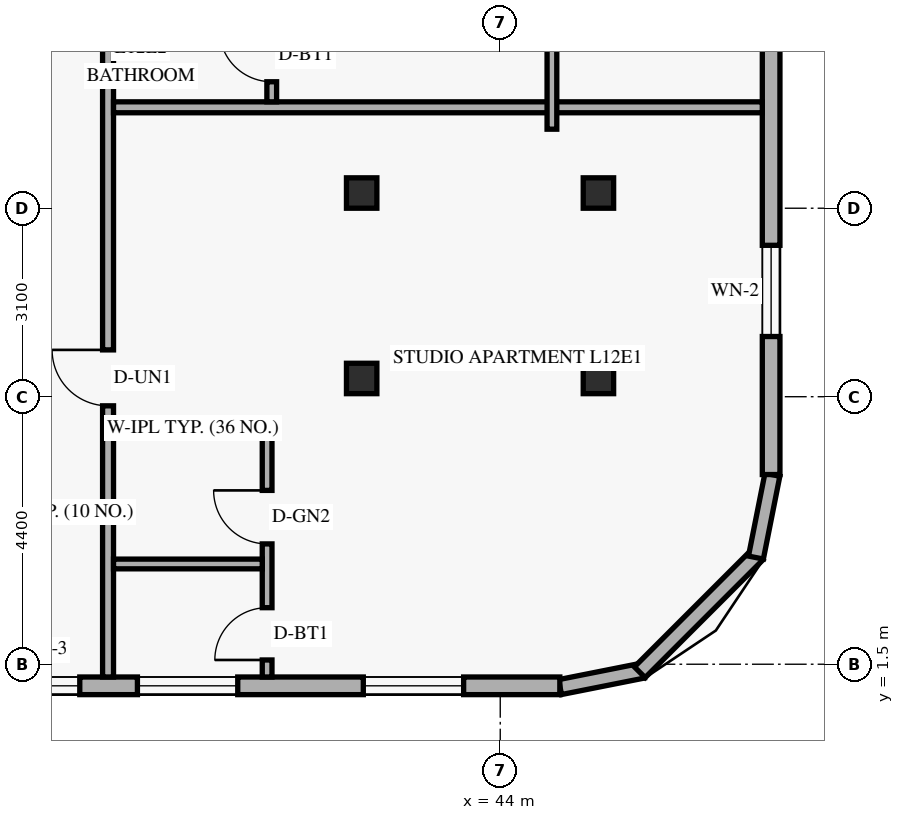
"""IFC4 building model, lengths in metres.
Left out: names, types, materials, properties, quantities, classifications, styles, units other than length and angle.
Written with IfcOpenShell. Run it as: python <this file> out.ifc"""

import sys

from ifc_helpers import new_model, si_unit, direction, frame, frame_2d, origin, origin_2d, place, context, subcontext, project, spatial, rectangle, hollow_rectangle, extrude, element, fill, save


model = new_model("IFC4")
c1 = context("Model", 3, precision=1e-05, world=origin(), true_north=direction((0.0, 1.0)))
c2 = subcontext(c1, "Body", "Model", "MODEL_VIEW")
j1 = project(units=[si_unit("LENGTHUNIT", "METRE"), si_unit("PLANEANGLEUNIT", "RADIAN")], contexts=[c1])
p1 = place(None, origin())
s1 = spatial("IfcSite", under=j1, at=p1, CompositionType="ELEMENT")
p2 = place(p1, origin())
s2 = spatial("IfcBuilding", under=s1, at=p2, CompositionType="ELEMENT")
p3 = place(p2, frame((0.0, 0.0, 49.2)))
s3 = spatial("IfcBuildingStorey", under=s2, at=p3, CompositionType="ELEMENT", Elevation=49.2)
for number, where, z_axis, x_axis in (
    (1, (41.658, 6.2, 0.0), (0.035, 0.0, 0.999), (0.0, 1.0, 0.0)),
    (2, (41.658, 9.25, 0.0), (0.035, 0.0, 0.999), (0.0, 1.0, 0.0)),
):
    element("IfcColumn", number, at=place(p3, frame(where, z_axis=z_axis, x_axis=x_axis)), inside=s3, PredefinedType="COLUMN", context=c2, shape_type="SweptSolid", body=[
        extrude(hollow_rectangle(XDim=0.5, YDim=0.5, WallThickness=0.022, at=origin_2d()), origin(), (0.0, 0.0, 1.0), 3.602),
    ])
for number, where, z_axis, x_axis in (
    (3, (45.51, 6.2, 0.0), (0.058, 0.0, 0.998), (0.0, 1.0, 0.0)),
    (4, (45.51, 9.25, 0.0), (0.058, 0.0, 0.998), (0.0, 1.0, 0.0)),
):
    element("IfcColumn", number, at=place(p3, frame(where, z_axis=z_axis, x_axis=x_axis)), inside=s3, PredefinedType="COLUMN", context=c2, shape_type="SweptSolid", body=[
        extrude(hollow_rectangle(XDim=0.5, YDim=0.5, WallThickness=0.022, at=origin_2d()), origin(), (0.0, 0.0, 1.0), 3.606),
    ])
p4 = place(p3, frame((44.983, 1.124, 0.0), z_axis=(0.0, 0.0, 1.0), x_axis=(0.980809899341, 0.19496651342, 0.0)))
e5 = element("IfcWall", 5, at=p4, inside=s3, PredefinedType="SOLIDWALL", context=c2, shape_type="SweptSolid", body=[
    extrude(rectangle(XDim=1.389, YDim=0.25, at=frame_2d((0.694, 0.0))), origin(), (0.0, 0.0, 1.0), 3.36),
])
p5 = place(p3, frame((46.295, 1.368, 0.0), z_axis=(0.0, 0.0, 1.0), x_axis=(0.707106781187, 0.707106781187, 0.0)))
e6 = element("IfcWall", 6, at=p5, inside=s3, PredefinedType="SOLIDWALL", context=c2, shape_type="SweptSolid", body=[
    extrude(rectangle(XDim=2.739, YDim=0.25, at=frame_2d((1.37, 0.0))), origin(), (0.0, 0.0, 1.0), 3.36),
])
p6 = place(p3, frame((48.205, 3.254, 0.0), z_axis=(0.0, 0.0, 1.0), x_axis=(0.19496651342, 0.980809899341, 0.0)))
e7 = element("IfcWall", 7, at=p6, inside=s3, PredefinedType="SOLIDWALL", context=c2, shape_type="SweptSolid", body=[
    extrude(rectangle(XDim=1.389, YDim=0.25, at=frame_2d((0.694, 0.0))), origin(), (0.0, 0.0, 1.0), 3.36),
])
p7 = place(p3, frame((5.42, 1.145, 0.0), z_axis=(0.0, 0.0, 1.0), x_axis=(1.0, 0.0, 0.0)))
e8 = element("IfcWall", 8, at=p7, inside=s3, PredefinedType="SOLIDWALL", context=c2, shape_type="SweptSolid", body=[
    extrude(rectangle(XDim=39.56, YDim=0.29, at=frame_2d((19.78, 0.0))), origin(), (0.0, 0.0, 1.0), 3.36),
])
p8 = place(p7, frame((2.615, 0.0, 0.85)))
e9 = element("IfcOpeningElement", 9, at=p8, cuts=e8, PredefinedType="OPENING", context=c2, shape_type="SweptSolid", body=[
    extrude(rectangle(XDim=1.65, YDim=1.6, at=frame_2d((0.825, 0.8))), frame((0.0, 0.155, 0.0), z_axis=(0.0, -1.0, 0.0), x_axis=(1.0, 0.0, 0.0)), (0.0, 0.0, 1.0), 0.31),
])
p9 = place(p7, frame((7.18, 0.0, 0.85)))
e10 = element("IfcOpeningElement", 10, at=p9, cuts=e8, PredefinedType="OPENING", context=c2, shape_type="SweptSolid", body=[
    extrude(rectangle(XDim=1.2, YDim=1.5, at=frame_2d((0.6, 0.75))), frame((0.0, 0.155, 0.0), z_axis=(0.0, -1.0, 0.0), x_axis=(1.0, 0.0, 0.0)), (0.0, 0.0, 1.0), 0.31),
])
p10 = place(p7, frame((11.906, 0.0, 0.85)))
e11 = element("IfcOpeningElement", 11, at=p10, cuts=e8, PredefinedType="OPENING", context=c2, shape_type="SweptSolid", body=[
    extrude(rectangle(XDim=1.65, YDim=1.6, at=frame_2d((0.825, 0.8))), frame((0.0, 0.155, 0.0), z_axis=(0.0, -1.0, 0.0), x_axis=(1.0, 0.0, 0.0)), (0.0, 0.0, 1.0), 0.31),
])
p11 = place(p7, frame((18.515, 0.0, 0.85)))
e12 = element("IfcOpeningElement", 12, at=p11, cuts=e8, PredefinedType="OPENING", context=c2, shape_type="SweptSolid", body=[
    extrude(rectangle(XDim=1.65, YDim=1.6, at=frame_2d((0.825, 0.8))), frame((0.0, 0.155, 0.0), z_axis=(0.0, -1.0, 0.0), x_axis=(1.0, 0.0, 0.0)), (0.0, 0.0, 1.0), 0.31),
])
p12 = place(p7, frame((25.124, 0.0, 0.85)))
e13 = element("IfcOpeningElement", 13, at=p12, cuts=e8, PredefinedType="OPENING", context=c2, shape_type="SweptSolid", body=[
    extrude(rectangle(XDim=1.65, YDim=1.6, at=frame_2d((0.825, 0.8))), frame((0.0, 0.155, 0.0), z_axis=(0.0, -1.0, 0.0), x_axis=(1.0, 0.0, 0.0)), (0.0, 0.0, 1.0), 0.31),
])
p13 = place(p7, frame((30.465, 0.0, 0.85)))
e14 = element("IfcOpeningElement", 14, at=p13, cuts=e8, PredefinedType="OPENING", context=c2, shape_type="SweptSolid", body=[
    extrude(rectangle(XDim=1.2, YDim=1.5, at=frame_2d((0.6, 0.75))), frame((0.0, 0.155, 0.0), z_axis=(0.0, -1.0, 0.0), x_axis=(1.0, 0.0, 0.0)), (0.0, 0.0, 1.0), 0.31),
])
p14 = place(p7, frame((32.613, 0.0, 0.85)))
e15 = element("IfcOpeningElement", 15, at=p14, cuts=e8, PredefinedType="OPENING", context=c2, shape_type="SweptSolid", body=[
    extrude(rectangle(XDim=1.65, YDim=1.6, at=frame_2d((0.825, 0.8))), frame((0.0, 0.155, 0.0), z_axis=(0.0, -1.0, 0.0), x_axis=(1.0, 0.0, 0.0)), (0.0, 0.0, 1.0), 0.31),
])
p15 = place(p7, frame((36.328, 0.0, 0.85)))
e16 = element("IfcOpeningElement", 16, at=p15, cuts=e8, PredefinedType="OPENING", context=c2, shape_type="SweptSolid", body=[
    extrude(rectangle(XDim=1.65, YDim=1.6, at=frame_2d((0.825, 0.8))), frame((0.0, 0.155, 0.0), z_axis=(0.0, -1.0, 0.0), x_axis=(1.0, 0.0, 0.0)), (0.0, 0.0, 1.0), 0.31),
])
p16 = place(p3, frame((48.455, 4.62, 0.0), z_axis=(0.0, 0.0, 1.0), x_axis=(0.0, 1.0, 0.0)))
e17 = element("IfcWall", 17, at=p16, inside=s3, PredefinedType="SOLIDWALL", context=c2, shape_type="SweptSolid", body=[
    extrude(rectangle(XDim=17.79, YDim=0.29, at=frame_2d((8.895, 0.0))), origin(), (0.0, 0.0, 1.0), 3.36),
])
p17 = place(p16, frame((2.27, 0.0, 0.85)))
e18 = element("IfcOpeningElement", 18, at=p17, cuts=e17, PredefinedType="OPENING", context=c2, shape_type="SweptSolid", body=[
    extrude(rectangle(XDim=1.5, YDim=1.55, at=frame_2d((0.75, 0.775))), frame((0.0, 0.155, 0.0), z_axis=(0.0, -1.0, 0.0), x_axis=(1.0, 0.0, 0.0)), (0.0, 0.0, 1.0), 0.31),
])
p18 = place(p16, frame((8.235, 0.0, 0.85)))
e19 = element("IfcOpeningElement", 19, at=p18, cuts=e17, PredefinedType="OPENING", context=c2, shape_type="SweptSolid", body=[
    extrude(rectangle(XDim=1.5, YDim=1.55, at=frame_2d((0.75, 0.775))), frame((0.0, 0.155, 0.0), z_axis=(0.0, -1.0, 0.0), x_axis=(1.0, 0.0, 0.0)), (0.0, 0.0, 1.0), 0.31),
])
p19 = place(p16, frame((14.11, 0.0, 0.85)))
e20 = element("IfcOpeningElement", 20, at=p19, cuts=e17, PredefinedType="OPENING", context=c2, shape_type="SweptSolid", body=[
    extrude(rectangle(XDim=1.5, YDim=1.55, at=frame_2d((0.75, 0.775))), frame((0.0, 0.155, 0.0), z_axis=(0.0, -1.0, 0.0), x_axis=(1.0, 0.0, 0.0)), (0.0, 0.0, 1.0), 0.31),
])
p20 = place(p3, frame((37.55, 1.29, 0.0), z_axis=(0.0, 0.0, 1.0), x_axis=(0.0, 1.0, 0.0)))
e21 = element("IfcWall", 21, at=p20, inside=s3, PredefinedType="STANDARD", context=c2, shape_type="SweptSolid", body=[
    extrude(rectangle(XDim=45.42, YDim=0.18, at=frame_2d((22.71, 0.0))), origin(), (0.0, 0.0, 1.0), 2.649),
])
p21 = place(p20, frame((4.46, 0.0, 0.0)))
e22 = element("IfcOpeningElement", 22, at=p21, cuts=e21, PredefinedType="OPENING", context=c2, shape_type="SweptSolid", body=[
    extrude(rectangle(XDim=0.92, YDim=2.15, at=frame_2d((0.46, 1.075))), frame((0.0, 0.1, 0.0), z_axis=(0.0, -1.0, 0.0), x_axis=(1.0, 0.0, 0.0)), (0.0, 0.0, 1.0), 0.2),
])
p22 = place(p20, frame((14.37, 0.0, 0.0)))
e23 = element("IfcOpeningElement", 23, at=p22, cuts=e21, PredefinedType="OPENING", context=c2, shape_type="SweptSolid", body=[
    extrude(rectangle(XDim=0.92, YDim=2.15, at=frame_2d((0.46, 1.075))), frame((0.0, 0.1, 0.0), z_axis=(0.0, -1.0, 0.0), x_axis=(1.0, 0.0, 0.0)), (0.0, 0.0, 1.0), 0.2),
])
p23 = place(p20, frame((25.87, 0.0, 0.0)))
e24 = element("IfcOpeningElement", 24, at=p23, cuts=e21, PredefinedType="OPENING", context=c2, shape_type="SweptSolid", body=[
    extrude(rectangle(XDim=0.92, YDim=2.15, at=frame_2d((0.46, 1.075))), frame((0.0, 0.1, 0.0), z_axis=(0.0, -1.0, 0.0), x_axis=(1.0, 0.0, 0.0)), (0.0, 0.0, 1.0), 0.2),
])
p24 = place(p20, frame((40.02, 0.0, 0.0)))
e25 = element("IfcOpeningElement", 25, at=p24, cuts=e21, PredefinedType="OPENING", context=c2, shape_type="SweptSolid", body=[
    extrude(rectangle(XDim=0.92, YDim=2.15, at=frame_2d((0.46, 1.075))), frame((0.0, 0.1, 0.0), z_axis=(0.0, -1.0, 0.0), x_axis=(1.0, 0.0, 0.0)), (0.0, 0.0, 1.0), 0.2),
])
p25 = place(p3, frame((37.64, 5.39, 0.0), z_axis=(0.0, 0.0, 1.0), x_axis=(1.0, 0.0, 0.0)))
e26 = element("IfcWall", 26, at=p25, inside=s3, PredefinedType="PLUMBINGWALL", context=c2, shape_type="SweptSolid", body=[
    extrude(rectangle(XDim=2.606, YDim=0.16, at=frame_2d((1.303, 0.0))), origin(), (0.0, 0.0, 1.0), 3.36),
])
p26 = place(p3, frame((40.166, 1.29, 0.0), z_axis=(0.0, 0.0, 1.0), x_axis=(0.0, 1.0, 0.0)))
e27 = element("IfcWall", 27, at=p26, inside=s3, PredefinedType="PLUMBINGWALL", context=c2, shape_type="SweptSolid", body=[
    extrude(rectangle(XDim=4.19, YDim=0.16, at=frame_2d((2.095, 0.0))), origin(), (0.0, 0.0, 1.0), 3.36),
])
p27 = place(p26, frame((0.28, 0.0, 0.0)))
e28 = element("IfcOpeningElement", 28, at=p27, cuts=e27, PredefinedType="OPENING", context=c2, shape_type="SweptSolid", body=[
    extrude(rectangle(XDim=0.86, YDim=2.12, at=frame_2d((0.43, 1.06))), frame((0.0, 0.09, 0.0), z_axis=(0.0, -1.0, 0.0), x_axis=(1.0, 0.0, 0.0)), (0.0, 0.0, 1.0), 0.18),
])
p28 = place(p26, frame((2.189, 0.0, 0.0)))
e29 = element("IfcOpeningElement", 29, at=p28, cuts=e27, PredefinedType="OPENING", context=c2, shape_type="SweptSolid", body=[
    extrude(rectangle(XDim=0.88, YDim=2.12, at=frame_2d((0.44, 1.06))), frame((0.0, 0.09, 0.0), z_axis=(0.0, -1.0, 0.0), x_axis=(1.0, 0.0, 0.0)), (0.0, 0.0, 1.0), 0.18),
])
p29 = place(p3, frame((37.64, 3.149, 0.0), z_axis=(0.0, 0.0, 1.0), x_axis=(1.0, 0.0, 0.0)))
e30 = element("IfcWall", 30, at=p29, inside=s3, PredefinedType="PLUMBINGWALL", context=c2, shape_type="SweptSolid", body=[
    extrude(rectangle(XDim=2.446, YDim=0.16, at=frame_2d((1.223, 0.0))), origin(), (0.0, 0.0, 1.0), 3.36),
])
p30 = place(p3, frame((37.64, 10.66, 0.0), z_axis=(0.0, 0.0, 1.0), x_axis=(1.0, 0.0, 0.0)))
e31 = element("IfcWall", 31, at=p30, inside=s3, PredefinedType="PARTITIONING", context=c2, shape_type="SweptSolid", body=[
    extrude(rectangle(XDim=10.67, YDim=0.18, at=frame_2d((5.335, 0.0))), origin(), (0.0, 0.0, 1.0), 2.649),
])
p31 = place(p3, frame((40.242, 10.75, 0.0), z_axis=(0.0, 0.0, 1.0), x_axis=(0.0, 1.0, 0.0)))
e32 = element("IfcWall", 32, at=p31, inside=s3, PredefinedType="PLUMBINGWALL", context=c2, shape_type="SweptSolid", body=[
    extrude(rectangle(XDim=4.64, YDim=0.16, at=frame_2d((2.32, 0.0))), origin(), (0.0, 0.0, 1.0), 2.932),
])
p32 = place(p31, frame((0.33, 0.0, 0.0)))
e33 = element("IfcOpeningElement", 33, at=p32, cuts=e32, PredefinedType="OPENING", context=c2, shape_type="SweptSolid", body=[
    extrude(rectangle(XDim=0.86, YDim=2.12, at=frame_2d((0.43, 1.06))), frame((0.0, 0.09, 0.0), z_axis=(0.0, -1.0, 0.0), x_axis=(1.0, 0.0, 0.0)), (0.0, 0.0, 1.0), 0.18),
])
p33 = place(p31, frame((2.423, 0.0, 0.0)))
e34 = element("IfcOpeningElement", 34, at=p33, cuts=e32, PredefinedType="OPENING", context=c2, shape_type="SweptSolid", body=[
    extrude(rectangle(XDim=0.88, YDim=2.12, at=frame_2d((0.44, 1.06))), frame((0.0, 0.09, 0.0), z_axis=(0.0, -1.0, 0.0), x_axis=(1.0, 0.0, 0.0)), (0.0, 0.0, 1.0), 0.18),
])
p34 = place(p3, frame((44.85, 10.3, 0.0), z_axis=(0.0, 0.0, 1.0), x_axis=(0.0, 1.0, 0.0)))
e35 = element("IfcWall", 35, at=p34, inside=s3, PredefinedType="PARTITIONING", context=c2, shape_type="SweptSolid", body=[
    extrude(rectangle(XDim=6.25, YDim=0.16, at=frame_2d((3.125, 0.0))), origin(), (0.0, 0.0, 1.0), 2.932),
])
p35 = place(p13, origin())
e36 = element("IfcWindow", 36, at=p35, inside=s3, PartitioningType="SINGLE_PANEL", PredefinedType="WINDOW", context=c2, shape_type="SweptSolid", body=[
    extrude(rectangle(XDim=1.2, YDim=1.5, at=frame_2d((0.6, 0.75))), frame((0.0, 0.03, 0.0), z_axis=(0.0, -1.0, 0.0), x_axis=(1.0, 0.0, 0.0)), (0.0, 0.0, 1.0), 0.06),
])
fill(e14, e36)
p36 = place(p14, origin())
e37 = element("IfcWindow", 37, at=p36, inside=s3, PartitioningType="SINGLE_PANEL", PredefinedType="WINDOW", context=c2, shape_type="SweptSolid", body=[
    extrude(rectangle(XDim=1.65, YDim=1.6, at=frame_2d((0.825, 0.8))), frame((0.0, 0.03, 0.0), z_axis=(0.0, -1.0, 0.0), x_axis=(1.0, 0.0, 0.0)), (0.0, 0.0, 1.0), 0.06),
])
fill(e15, e37)
p37 = place(p15, origin())
e38 = element("IfcWindow", 38, at=p37, inside=s3, PartitioningType="SINGLE_PANEL", PredefinedType="WINDOW", context=c2, shape_type="SweptSolid", body=[
    extrude(rectangle(XDim=1.65, YDim=1.6, at=frame_2d((0.825, 0.8))), frame((0.0, 0.03, 0.0), z_axis=(0.0, -1.0, 0.0), x_axis=(1.0, 0.0, 0.0)), (0.0, 0.0, 1.0), 0.06),
])
fill(e16, e38)
p38 = place(p17, origin())
e39 = element("IfcWindow", 39, at=p38, inside=s3, PartitioningType="SINGLE_PANEL", PredefinedType="WINDOW", context=c2, shape_type="SweptSolid", body=[
    extrude(rectangle(XDim=1.5, YDim=1.55, at=frame_2d((0.75, 0.775))), frame((0.0, 0.03, 0.0), z_axis=(0.0, -1.0, 0.0), x_axis=(1.0, 0.0, 0.0)), (0.0, 0.0, 1.0), 0.06),
])
fill(e18, e39)
p39 = place(p21, origin())
e40 = element("IfcDoor", 40, at=p39, inside=s3, OperationType="SINGLE_SWING_RIGHT", PredefinedType="DOOR", context=c2, shape_type="SweptSolid", body=[
    extrude(rectangle(XDim=0.92, YDim=2.15, at=frame_2d((0.46, 1.075))), frame((0.0, 0.025, 0.0), z_axis=(0.0, -1.0, 0.0), x_axis=(1.0, 0.0, 0.0)), (0.0, 0.0, 1.0), 0.05),
])
fill(e22, e40)
p40 = place(p27, origin())
e41 = element("IfcDoor", 41, at=p40, inside=s3, OperationType="SINGLE_SWING_LEFT", PredefinedType="DOOR", context=c2, shape_type="SweptSolid", body=[
    extrude(rectangle(XDim=0.86, YDim=2.12, at=frame_2d((0.43, 1.06))), frame((0.0, 0.025, 0.0), z_axis=(0.0, -1.0, 0.0), x_axis=(1.0, 0.0, 0.0)), (0.0, 0.0, 1.0), 0.05),
])
fill(e28, e41)
p41 = place(p28, origin())
e42 = element("IfcDoor", 42, at=p41, inside=s3, OperationType="SINGLE_SWING_RIGHT", PredefinedType="DOOR", context=c2, shape_type="SweptSolid", body=[
    extrude(rectangle(XDim=0.88, YDim=2.12, at=frame_2d((0.44, 1.06))), frame((0.0, 0.025, 0.0), z_axis=(0.0, -1.0, 0.0), x_axis=(1.0, 0.0, 0.0)), (0.0, 0.0, 1.0), 0.05),
])
fill(e29, e42)
p42 = place(p32, origin())
e43 = element("IfcDoor", 43, at=p42, inside=s3, OperationType="SINGLE_SWING_RIGHT", PredefinedType="DOOR", context=c2, shape_type="SweptSolid", body=[
    extrude(rectangle(XDim=0.86, YDim=2.12, at=frame_2d((0.43, 1.06))), frame((0.0, 0.025, 0.0), z_axis=(0.0, -1.0, 0.0), x_axis=(1.0, 0.0, 0.0)), (0.0, 0.0, 1.0), 0.05),
])
fill(e33, e43)
save(model, sys.argv[1])
